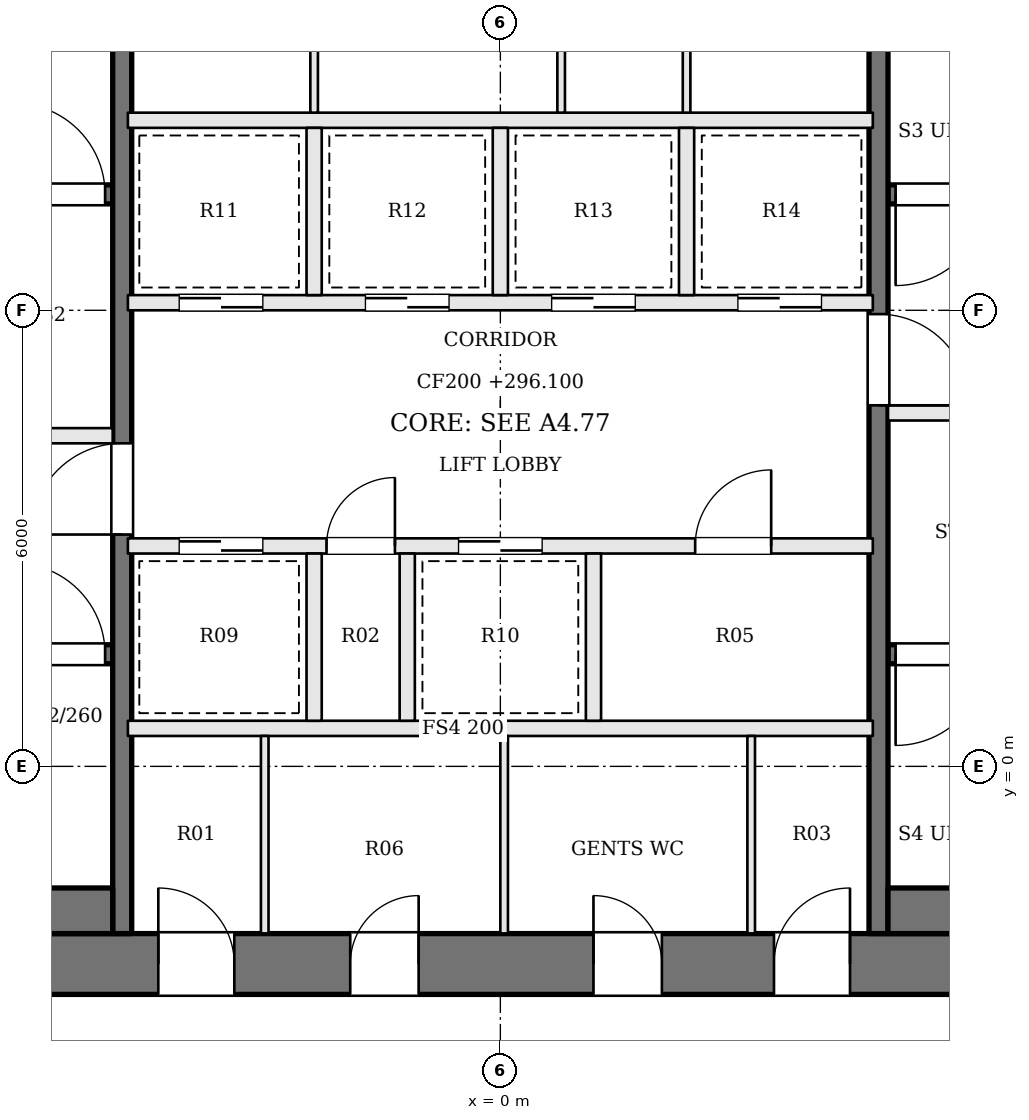
"""IFC4 building model, lengths in metres.
Left out: names, types, materials, properties, quantities, classifications, styles, units other than length and angle.
Written with IfcOpenShell. Run it as: python <this file> out.ifc"""

import sys

from ifc_helpers import new_model, si_unit, direction, frame, frame_2d, origin, place, context, subcontext, project, spatial, rectangle, extrude, element, fill, save


model = new_model("IFC4")
c1 = context("Model", 3, precision=1e-05, world=origin(), true_north=direction((0.0, 1.0)))
c2 = subcontext(c1, "Body", "Model", "MODEL_VIEW")
j1 = project(units=[si_unit("LENGTHUNIT", "METRE"), si_unit("PLANEANGLEUNIT", "RADIAN")], contexts=[c1])
p1 = place(None, origin())
s1 = spatial("IfcSite", under=j1, at=p1, CompositionType="ELEMENT")
p2 = place(p1, origin())
s2 = spatial("IfcBuilding", under=s1, at=p2, CompositionType="ELEMENT")
p3 = place(p2, frame((0.0, 0.0, 296.1)))
s3 = spatial("IfcBuildingStorey", under=s2, at=p3, CompositionType="ELEMENT", Elevation=296.1)
p4 = place(p3, frame((-13.0, -2.6, 0.0), z_axis=(0.0, 0.0, 1.0), x_axis=(1.0, 0.0, 0.0)))
e1 = element("IfcWall", 1, at=p4, inside=s3, PredefinedType="SHEAR", context=c2, shape_type="SweptSolid", body=[
    extrude(rectangle(XDim=26.0, YDim=0.8, at=frame_2d((13.0, 0.0))), origin(), (0.0, 0.0, 1.0), 3.9),
])
p5 = place(p4, frame((8.5, 0.0, 0.0)))
e2 = element("IfcOpeningElement", 2, at=p5, cuts=e1, PredefinedType="OPENING", context=c2, shape_type="SweptSolid", body=[
    extrude(rectangle(XDim=1.0, YDim=2.1, at=frame_2d((0.5, 1.05))), frame((0.0, 0.41, 0.0), z_axis=(0.0, -1.0, 0.0), x_axis=(1.0, 0.0, 0.0)), (0.0, 0.0, 1.0), 0.82),
])
p6 = place(p4, frame((11.025, 0.0, 0.0)))
e3 = element("IfcOpeningElement", 3, at=p6, cuts=e1, PredefinedType="OPENING", context=c2, shape_type="SweptSolid", body=[
    extrude(rectangle(XDim=0.9, YDim=2.1, at=frame_2d((0.45, 1.05))), frame((0.0, 0.41, 0.0), z_axis=(0.0, -1.0, 0.0), x_axis=(1.0, 0.0, 0.0)), (0.0, 0.0, 1.0), 0.82),
])
p7 = place(p4, frame((14.225, 0.0, 0.0)))
e4 = element("IfcOpeningElement", 4, at=p7, cuts=e1, PredefinedType="OPENING", context=c2, shape_type="SweptSolid", body=[
    extrude(rectangle(XDim=0.9, YDim=2.1, at=frame_2d((0.45, 1.05))), frame((0.0, 0.41, 0.0), z_axis=(0.0, -1.0, 0.0), x_axis=(1.0, 0.0, 0.0)), (0.0, 0.0, 1.0), 0.82),
])
p8 = place(p4, frame((16.6, 0.0, 0.0)))
e5 = element("IfcOpeningElement", 5, at=p8, cuts=e1, PredefinedType="OPENING", context=c2, shape_type="SweptSolid", body=[
    extrude(rectangle(XDim=1.0, YDim=2.1, at=frame_2d((0.5, 1.05))), frame((0.0, 0.41, 0.0), z_axis=(0.0, -1.0, 0.0), x_axis=(1.0, 0.0, 0.0)), (0.0, 0.0, 1.0), 0.82),
])
p9 = place(p3, frame((-12.2, 1.475, 0.0), z_axis=(0.0, 0.0, 1.0), x_axis=(1.0, 0.0, 0.0)))
e6 = element("IfcWall", 6, at=p9, inside=s3, PredefinedType="SOLIDWALL", context=c2, shape_type="SweptSolid", body=[
    extrude(rectangle(XDim=7.1, YDim=0.25, at=frame_2d((3.55, 0.0))), origin(), (0.0, 0.0, 1.0), 3.7),
])
p10 = place(p9, frame((5.8, 0.0, 0.0)))
e7 = element("IfcOpeningElement", 7, at=p10, cuts=e6, PredefinedType="OPENING", context=c2, shape_type="SweptSolid", body=[
    extrude(rectangle(XDim=1.2, YDim=2.1, at=frame_2d((0.6, 1.05))), frame((0.0, 0.135, 0.0), z_axis=(0.0, -1.0, 0.0), x_axis=(1.0, 0.0, 0.0)), (0.0, 0.0, 1.0), 0.27),
])
p11 = place(p3, frame((12.2, 7.525, 0.0), z_axis=(0.0, 0.0, 1.0), x_axis=(-1.0, 0.0, 0.0)))
e8 = element("IfcWall", 8, at=p11, inside=s3, PredefinedType="SOLIDWALL", context=c2, shape_type="SweptSolid", body=[
    extrude(rectangle(XDim=7.1, YDim=0.25, at=frame_2d((3.55, 0.0))), origin(), (0.0, 0.0, 1.0), 3.7),
])
p12 = place(p11, frame((5.8, 0.0, 0.0)))
e9 = element("IfcOpeningElement", 9, at=p12, cuts=e8, PredefinedType="OPENING", context=c2, shape_type="SweptSolid", body=[
    extrude(rectangle(XDim=1.2, YDim=2.1, at=frame_2d((0.6, 1.05))), frame((0.0, 0.135, 0.0), z_axis=(0.0, -1.0, 0.0), x_axis=(1.0, 0.0, 0.0)), (0.0, 0.0, 1.0), 0.27),
])
p13 = place(p3, frame((-12.2, 4.35, 0.0), z_axis=(0.0, 0.0, 1.0), x_axis=(1.0, 0.0, 0.0)))
e10 = element("IfcWall", 10, at=p13, inside=s3, PredefinedType="SOLIDWALL", context=c2, shape_type="SweptSolid", body=[
    extrude(rectangle(XDim=7.1, YDim=0.2, at=frame_2d((3.55, 0.0))), origin(), (0.0, 0.0, 1.0), 3.7),
])
p14 = place(p13, frame((4.4, 0.0, 0.0)))
e11 = element("IfcOpeningElement", 11, at=p14, cuts=e10, PredefinedType="OPENING", context=c2, shape_type="SweptSolid", body=[
    extrude(rectangle(XDim=1.2, YDim=2.1, at=frame_2d((0.6, 1.05))), frame((0.0, 0.11, 0.0), z_axis=(0.0, -1.0, 0.0), x_axis=(1.0, 0.0, 0.0)), (0.0, 0.0, 1.0), 0.22),
])
p15 = place(p13, frame((1.1, 0.0, 0.0)))
e12 = element("IfcOpeningElement", 12, at=p15, cuts=e10, PredefinedType="OPENING", context=c2, shape_type="SweptSolid", body=[
    extrude(rectangle(XDim=1.2, YDim=2.1, at=frame_2d((0.6, 1.05))), frame((0.0, 0.11, 0.0), z_axis=(0.0, -1.0, 0.0), x_axis=(1.0, 0.0, 0.0)), (0.0, 0.0, 1.0), 0.22),
])
p16 = place(p3, frame((12.2, 4.65, 0.0), z_axis=(0.0, 0.0, 1.0), x_axis=(-1.0, 0.0, 0.0)))
e13 = element("IfcWall", 13, at=p16, inside=s3, PredefinedType="SOLIDWALL", context=c2, shape_type="SweptSolid", body=[
    extrude(rectangle(XDim=7.1, YDim=0.2, at=frame_2d((3.55, 0.0))), origin(), (0.0, 0.0, 1.0), 3.7),
])
p17 = place(p16, frame((4.4, 0.0, 0.0)))
e14 = element("IfcOpeningElement", 14, at=p17, cuts=e13, PredefinedType="OPENING", context=c2, shape_type="SweptSolid", body=[
    extrude(rectangle(XDim=1.2, YDim=2.1, at=frame_2d((0.6, 1.05))), frame((0.0, 0.11, 0.0), z_axis=(0.0, -1.0, 0.0), x_axis=(1.0, 0.0, 0.0)), (0.0, 0.0, 1.0), 0.22),
])
p18 = place(p16, frame((1.1, 0.0, 0.0)))
e15 = element("IfcOpeningElement", 15, at=p18, cuts=e13, PredefinedType="OPENING", context=c2, shape_type="SweptSolid", body=[
    extrude(rectangle(XDim=1.2, YDim=2.1, at=frame_2d((0.6, 1.05))), frame((0.0, 0.11, 0.0), z_axis=(0.0, -1.0, 0.0), x_axis=(1.0, 0.0, 0.0)), (0.0, 0.0, 1.0), 0.22),
])
p19 = place(p3, frame((-12.2, 7.525, 0.0), z_axis=(0.0, 0.0, 1.0), x_axis=(1.0, 0.0, 0.0)))
e16 = element("IfcWall", 16, at=p19, inside=s3, PredefinedType="SOLIDWALL", context=c2, shape_type="SweptSolid", body=[
    extrude(rectangle(XDim=7.1, YDim=0.25, at=frame_2d((3.55, 0.0))), origin(), (0.0, 0.0, 1.0), 3.7),
])
p20 = place(p19, frame((5.8, 0.0, 0.0)))
e17 = element("IfcOpeningElement", 17, at=p20, cuts=e16, PredefinedType="OPENING", context=c2, shape_type="SweptSolid", body=[
    extrude(rectangle(XDim=1.2, YDim=2.1, at=frame_2d((0.6, 1.05))), frame((0.0, 0.135, 0.0), z_axis=(0.0, -1.0, 0.0), x_axis=(1.0, 0.0, 0.0)), (0.0, 0.0, 1.0), 0.27),
])
p21 = place(p3, frame((12.2, 1.475, 0.0), z_axis=(0.0, 0.0, 1.0), x_axis=(-1.0, 0.0, 0.0)))
e18 = element("IfcWall", 18, at=p21, inside=s3, PredefinedType="SOLIDWALL", context=c2, shape_type="SweptSolid", body=[
    extrude(rectangle(XDim=7.1, YDim=0.25, at=frame_2d((3.55, 0.0))), origin(), (0.0, 0.0, 1.0), 3.7),
])
p22 = place(p21, frame((5.8, 0.0, 0.0)))
e19 = element("IfcOpeningElement", 19, at=p22, cuts=e18, PredefinedType="OPENING", context=c2, shape_type="SweptSolid", body=[
    extrude(rectangle(XDim=1.2, YDim=2.1, at=frame_2d((0.6, 1.05))), frame((0.0, 0.135, 0.0), z_axis=(0.0, -1.0, 0.0), x_axis=(1.0, 0.0, 0.0)), (0.0, 0.0, 1.0), 0.27),
])
p23 = place(p3, frame((-4.975, -2.2, 0.0), z_axis=(0.0, 0.0, 1.0), x_axis=(0.0, 1.0, 0.0)))
e20 = element("IfcWall", 20, at=p23, inside=s3, PredefinedType="SOLIDWALL", context=c2, shape_type="SweptSolid", body=[
    extrude(rectangle(XDim=13.4, YDim=0.25, at=frame_2d((6.7, 0.0))), origin(), (0.0, 0.0, 1.0), 3.7),
])
p24 = place(p23, frame((5.25, 0.0, 0.0)))
e21 = element("IfcOpeningElement", 21, at=p24, cuts=e20, PredefinedType="OPENING", context=c2, shape_type="SweptSolid", body=[
    extrude(rectangle(XDim=1.2, YDim=2.1, at=frame_2d((0.6, 1.05))), frame((0.0, 0.135, 0.0), z_axis=(0.0, -1.0, 0.0), x_axis=(1.0, 0.0, 0.0)), (0.0, 0.0, 1.0), 0.27),
])
p25 = place(p3, frame((4.975, 11.2, 0.0), z_axis=(0.0, 0.0, 1.0), x_axis=(0.0, -1.0, 0.0)))
e22 = element("IfcWall", 22, at=p25, inside=s3, PredefinedType="SOLIDWALL", context=c2, shape_type="SweptSolid", body=[
    extrude(rectangle(XDim=13.4, YDim=0.25, at=frame_2d((6.7, 0.0))), origin(), (0.0, 0.0, 1.0), 3.7),
])
p26 = place(p25, frame((5.25, 0.0, 0.0)))
e23 = element("IfcOpeningElement", 23, at=p26, cuts=e22, PredefinedType="OPENING", context=c2, shape_type="SweptSolid", body=[
    extrude(rectangle(XDim=1.2, YDim=2.1, at=frame_2d((0.6, 1.05))), frame((0.0, 0.135, 0.0), z_axis=(0.0, -1.0, 0.0), x_axis=(1.0, 0.0, 0.0)), (0.0, 0.0, 1.0), 0.27),
])
for number, where, z_axis, x_axis in (
    (24, (-12.2, -1.9, 0.0), (0.0, 0.0, 1.0), (1.0, 0.0, 0.0)),
    (25, (12.2, -1.9, 0.0), (0.0, 0.0, 1.0), (-1.0, 0.0, 0.0)),
):
    element("IfcWall", number, at=place(p3, frame(where, z_axis=z_axis, x_axis=x_axis)), inside=s3, PredefinedType="SOLIDWALL", context=c2, shape_type="SweptSolid", body=[
        extrude(rectangle(XDim=7.1, YDim=0.6, at=frame_2d((3.55, 0.0))), origin(), (0.0, 0.0, 1.0), 3.7),
    ])
p27 = place(p3, frame((-4.9, 0.5, 0.0), z_axis=(0.0, 0.0, 1.0), x_axis=(1.0, 0.0, 0.0)))
e26 = element("IfcWall", 26, at=p27, inside=s3, PredefinedType="SOLIDWALL", context=c2, shape_type="SweptSolid", body=[
    extrude(rectangle(XDim=9.8, YDim=0.2, at=frame_2d((4.9, 0.0))), origin(), (0.0, 0.0, 1.0), 3.7),
])
p28 = place(p3, frame((-4.9, 2.9, 0.0), z_axis=(0.0, 0.0, 1.0), x_axis=(1.0, 0.0, 0.0)))
e27 = element("IfcWall", 27, at=p28, inside=s3, PredefinedType="SOLIDWALL", context=c2, shape_type="SweptSolid", body=[
    extrude(rectangle(XDim=9.8, YDim=0.2, at=frame_2d((4.9, 0.0))), origin(), (0.0, 0.0, 1.0), 3.7),
])
p29 = place(p28, frame((0.675, 0.0, 0.0)))
e28 = element("IfcOpeningElement", 28, at=p29, cuts=e27, PredefinedType="OPENING", context=c2, shape_type="SweptSolid", body=[
    extrude(rectangle(XDim=1.1, YDim=2.1, at=frame_2d((0.55, 1.05))), frame((0.0, 0.11, 0.0), z_axis=(0.0, -1.0, 0.0), x_axis=(1.0, 0.0, 0.0)), (0.0, 0.0, 1.0), 0.22),
])
p30 = place(p28, frame((2.613, 0.0, 0.0)))
e29 = element("IfcOpeningElement", 29, at=p30, cuts=e27, PredefinedType="OPENING", context=c2, shape_type="SweptSolid", body=[
    extrude(rectangle(XDim=0.9, YDim=2.1, at=frame_2d((0.45, 1.05))), frame((0.0, 0.11, 0.0), z_axis=(0.0, -1.0, 0.0), x_axis=(1.0, 0.0, 0.0)), (0.0, 0.0, 1.0), 0.22),
])
p31 = place(p28, frame((4.35, 0.0, 0.0)))
e30 = element("IfcOpeningElement", 30, at=p31, cuts=e27, PredefinedType="OPENING", context=c2, shape_type="SweptSolid", body=[
    extrude(rectangle(XDim=1.1, YDim=2.1, at=frame_2d((0.55, 1.05))), frame((0.0, 0.11, 0.0), z_axis=(0.0, -1.0, 0.0), x_axis=(1.0, 0.0, 0.0)), (0.0, 0.0, 1.0), 0.22),
])
p32 = place(p28, frame((7.463, 0.0, 0.0)))
e31 = element("IfcOpeningElement", 31, at=p32, cuts=e27, PredefinedType="OPENING", context=c2, shape_type="SweptSolid", body=[
    extrude(rectangle(XDim=1.0, YDim=2.1, at=frame_2d((0.5, 1.05))), frame((0.0, 0.11, 0.0), z_axis=(0.0, -1.0, 0.0), x_axis=(1.0, 0.0, 0.0)), (0.0, 0.0, 1.0), 0.22),
])
p33 = place(p3, frame((-4.9, 6.1, 0.0), z_axis=(0.0, 0.0, 1.0), x_axis=(1.0, 0.0, 0.0)))
e32 = element("IfcWall", 32, at=p33, inside=s3, PredefinedType="SOLIDWALL", context=c2, shape_type="SweptSolid", body=[
    extrude(rectangle(XDim=9.8, YDim=0.2, at=frame_2d((4.9, 0.0))), origin(), (0.0, 0.0, 1.0), 3.7),
])
p34 = place(p33, frame((0.675, 0.0, 0.0)))
e33 = element("IfcOpeningElement", 33, at=p34, cuts=e32, PredefinedType="OPENING", context=c2, shape_type="SweptSolid", body=[
    extrude(rectangle(XDim=1.1, YDim=2.1, at=frame_2d((0.55, 1.05))), frame((0.0, 0.11, 0.0), z_axis=(0.0, -1.0, 0.0), x_axis=(1.0, 0.0, 0.0)), (0.0, 0.0, 1.0), 0.22),
])
p35 = place(p33, frame((3.125, 0.0, 0.0)))
e34 = element("IfcOpeningElement", 34, at=p35, cuts=e32, PredefinedType="OPENING", context=c2, shape_type="SweptSolid", body=[
    extrude(rectangle(XDim=1.1, YDim=2.1, at=frame_2d((0.55, 1.05))), frame((0.0, 0.11, 0.0), z_axis=(0.0, -1.0, 0.0), x_axis=(1.0, 0.0, 0.0)), (0.0, 0.0, 1.0), 0.22),
])
p36 = place(p33, frame((5.575, 0.0, 0.0)))
e35 = element("IfcOpeningElement", 35, at=p36, cuts=e32, PredefinedType="OPENING", context=c2, shape_type="SweptSolid", body=[
    extrude(rectangle(XDim=1.1, YDim=2.1, at=frame_2d((0.55, 1.05))), frame((0.0, 0.11, 0.0), z_axis=(0.0, -1.0, 0.0), x_axis=(1.0, 0.0, 0.0)), (0.0, 0.0, 1.0), 0.22),
])
p37 = place(p33, frame((8.025, 0.0, 0.0)))
e36 = element("IfcOpeningElement", 36, at=p37, cuts=e32, PredefinedType="OPENING", context=c2, shape_type="SweptSolid", body=[
    extrude(rectangle(XDim=1.1, YDim=2.1, at=frame_2d((0.55, 1.05))), frame((0.0, 0.11, 0.0), z_axis=(0.0, -1.0, 0.0), x_axis=(1.0, 0.0, 0.0)), (0.0, 0.0, 1.0), 0.22),
])
p38 = place(p3, frame((-4.9, 8.5, 0.0), z_axis=(0.0, 0.0, 1.0), x_axis=(1.0, 0.0, 0.0)))
e37 = element("IfcWall", 37, at=p38, inside=s3, PredefinedType="SOLIDWALL", context=c2, shape_type="SweptSolid", body=[
    extrude(rectangle(XDim=9.8, YDim=0.2, at=frame_2d((4.9, 0.0))), origin(), (0.0, 0.0, 1.0), 3.7),
])
for number, where, z_axis, x_axis in (
    (38, (-2.45, 0.6, 0.0), (0.0, 0.0, 1.0), (0.0, 1.0, 0.0)),
    (39, (-1.225, 0.6, 0.0), (0.0, 0.0, 1.0), (0.0, 1.0, 0.0)),
    (40, (1.225, 0.6, 0.0), (0.0, 0.0, 1.0), (0.0, 1.0, 0.0)),
    (41, (-2.45, 6.2, 0.0), (0.0, 0.0, 1.0), (0.0, 1.0, 0.0)),
    (42, (0.0, 6.2, 0.0), (0.0, 0.0, 1.0), (0.0, 1.0, 0.0)),
    (43, (2.45, 6.2, 0.0), (0.0, 0.0, 1.0), (0.0, 1.0, 0.0)),
):
    element("IfcWall", number, at=place(p3, frame(where, z_axis=z_axis, x_axis=x_axis)), inside=s3, PredefinedType="SOLIDWALL", context=c2, shape_type="SweptSolid", body=[
        extrude(rectangle(XDim=2.2, YDim=0.2, at=frame_2d((1.1, 0.0))), origin(), (0.0, 0.0, 1.0), 3.7),
    ])
for number, where, z_axis, x_axis in (
    (44, (-3.1, -2.2, 0.0), (0.0, 0.0, 1.0), (0.0, 1.0, 0.0)),
    (45, (0.05, -2.2, 0.0), (0.0, 0.0, 1.0), (0.0, 1.0, 0.0)),
    (46, (3.3, -2.2, 0.0), (0.0, 0.0, 1.0), (0.0, 1.0, 0.0)),
    (47, (-2.45, 8.6, 0.0), (0.0, 0.0, 1.0), (0.0, 1.0, 0.0)),
    (48, (0.8, 8.6, 0.0), (0.0, 0.0, 1.0), (0.0, 1.0, 0.0)),
    (49, (2.45, 8.6, 0.0), (0.0, 0.0, 1.0), (0.0, 1.0, 0.0)),
):
    element("IfcWall", number, at=place(p3, frame(where, z_axis=z_axis, x_axis=x_axis)), inside=s3, PredefinedType="PARTITIONING", context=c2, shape_type="SweptSolid", body=[
        extrude(rectangle(XDim=2.6, YDim=0.1, at=frame_2d((1.3, 0.0))), origin(), (0.0, 0.0, 1.0), 3.7),
    ])
p39 = place(p24, origin())
e50 = element("IfcDoor", 50, at=p39, inside=s3, OperationType="SINGLE_SWING_LEFT", PredefinedType="DOOR", context=c2, shape_type="SweptSolid", body=[
    extrude(rectangle(XDim=1.2, YDim=2.1, at=frame_2d((0.6, 1.05))), frame((0.0, 0.025, 0.0), z_axis=(0.0, -1.0, 0.0), x_axis=(1.0, 0.0, 0.0)), (0.0, 0.0, 1.0), 0.05),
])
fill(e21, e50)
p40 = place(p26, origin())
e51 = element("IfcDoor", 51, at=p40, inside=s3, OperationType="SINGLE_SWING_RIGHT", PredefinedType="DOOR", context=c2, shape_type="SweptSolid", body=[
    extrude(rectangle(XDim=1.2, YDim=2.1, at=frame_2d((0.6, 1.05))), frame((0.0, 0.025, 0.0), z_axis=(0.0, -1.0, 0.0), x_axis=(1.0, 0.0, 0.0)), (0.0, 0.0, 1.0), 0.05),
])
fill(e23, e51)
p41 = place(p10, origin())
e52 = element("IfcDoor", 52, at=p41, inside=s3, OperationType="SINGLE_SWING_LEFT", PredefinedType="DOOR", context=c2, shape_type="SweptSolid", body=[
    extrude(rectangle(XDim=1.2, YDim=2.1, at=frame_2d((0.6, 1.05))), frame((0.0, 0.025, 0.0), z_axis=(0.0, -1.0, 0.0), x_axis=(1.0, 0.0, 0.0)), (0.0, 0.0, 1.0), 0.05),
])
fill(e7, e52)
p42 = place(p12, origin())
e53 = element("IfcDoor", 53, at=p42, inside=s3, OperationType="SINGLE_SWING_RIGHT", PredefinedType="DOOR", context=c2, shape_type="SweptSolid", body=[
    extrude(rectangle(XDim=1.2, YDim=2.1, at=frame_2d((0.6, 1.05))), frame((0.0, 0.025, 0.0), z_axis=(0.0, -1.0, 0.0), x_axis=(1.0, 0.0, 0.0)), (0.0, 0.0, 1.0), 0.05),
])
fill(e9, e53)
p43 = place(p20, origin())
e54 = element("IfcDoor", 54, at=p43, inside=s3, OperationType="SINGLE_SWING_LEFT", PredefinedType="DOOR", context=c2, shape_type="SweptSolid", body=[
    extrude(rectangle(XDim=1.2, YDim=2.1, at=frame_2d((0.6, 1.05))), frame((0.0, 0.025, 0.0), z_axis=(0.0, -1.0, 0.0), x_axis=(1.0, 0.0, 0.0)), (0.0, 0.0, 1.0), 0.05),
])
fill(e17, e54)
p44 = place(p22, origin())
e55 = element("IfcDoor", 55, at=p44, inside=s3, OperationType="SINGLE_SWING_RIGHT", PredefinedType="DOOR", context=c2, shape_type="SweptSolid", body=[
    extrude(rectangle(XDim=1.2, YDim=2.1, at=frame_2d((0.6, 1.05))), frame((0.0, 0.025, 0.0), z_axis=(0.0, -1.0, 0.0), x_axis=(1.0, 0.0, 0.0)), (0.0, 0.0, 1.0), 0.05),
])
fill(e19, e55)
p45 = place(p29, origin())
e56 = element("IfcDoor", 56, at=p45, inside=s3, OperationType="SLIDING_TO_RIGHT", PredefinedType="DOOR", context=c2, shape_type="SweptSolid", body=[
    extrude(rectangle(XDim=1.1, YDim=2.1, at=frame_2d((0.55, 1.05))), frame((0.0, 0.025, 0.0), z_axis=(0.0, -1.0, 0.0), x_axis=(1.0, 0.0, 0.0)), (0.0, 0.0, 1.0), 0.05),
])
fill(e28, e56)
p46 = place(p30, origin())
e57 = element("IfcDoor", 57, at=p46, inside=s3, OperationType="SINGLE_SWING_RIGHT", PredefinedType="DOOR", context=c2, shape_type="SweptSolid", body=[
    extrude(rectangle(XDim=0.9, YDim=2.1, at=frame_2d((0.45, 1.05))), frame((0.0, 0.025, 0.0), z_axis=(0.0, -1.0, 0.0), x_axis=(1.0, 0.0, 0.0)), (0.0, 0.0, 1.0), 0.05),
])
fill(e29, e57)
p47 = place(p31, origin())
e58 = element("IfcDoor", 58, at=p47, inside=s3, OperationType="SLIDING_TO_LEFT", PredefinedType="DOOR", context=c2, shape_type="SweptSolid", body=[
    extrude(rectangle(XDim=1.1, YDim=2.1, at=frame_2d((0.55, 1.05))), frame((0.0, 0.025, 0.0), z_axis=(0.0, -1.0, 0.0), x_axis=(1.0, 0.0, 0.0)), (0.0, 0.0, 1.0), 0.05),
])
fill(e30, e58)
p48 = place(p32, origin())
e59 = element("IfcDoor", 59, at=p48, inside=s3, OperationType="SINGLE_SWING_RIGHT", PredefinedType="DOOR", context=c2, shape_type="SweptSolid", body=[
    extrude(rectangle(XDim=1.0, YDim=2.1, at=frame_2d((0.5, 1.05))), frame((0.0, 0.025, 0.0), z_axis=(0.0, -1.0, 0.0), x_axis=(1.0, 0.0, 0.0)), (0.0, 0.0, 1.0), 0.05),
])
fill(e31, e59)
p49 = place(p34, origin())
e60 = element("IfcDoor", 60, at=p49, inside=s3, OperationType="SLIDING_TO_RIGHT", PredefinedType="DOOR", context=c2, shape_type="SweptSolid", body=[
    extrude(rectangle(XDim=1.1, YDim=2.1, at=frame_2d((0.55, 1.05))), frame((0.0, 0.025, 0.0), z_axis=(0.0, -1.0, 0.0), x_axis=(1.0, 0.0, 0.0)), (0.0, 0.0, 1.0), 0.05),
])
fill(e33, e60)
p50 = place(p35, origin())
e61 = element("IfcDoor", 61, at=p50, inside=s3, OperationType="SLIDING_TO_LEFT", PredefinedType="DOOR", context=c2, shape_type="SweptSolid", body=[
    extrude(rectangle(XDim=1.1, YDim=2.1, at=frame_2d((0.55, 1.05))), frame((0.0, 0.025, 0.0), z_axis=(0.0, -1.0, 0.0), x_axis=(1.0, 0.0, 0.0)), (0.0, 0.0, 1.0), 0.05),
])
fill(e34, e61)
p51 = place(p36, origin())
e62 = element("IfcDoor", 62, at=p51, inside=s3, OperationType="SLIDING_TO_RIGHT", PredefinedType="DOOR", context=c2, shape_type="SweptSolid", body=[
    extrude(rectangle(XDim=1.1, YDim=2.1, at=frame_2d((0.55, 1.05))), frame((0.0, 0.025, 0.0), z_axis=(0.0, -1.0, 0.0), x_axis=(1.0, 0.0, 0.0)), (0.0, 0.0, 1.0), 0.05),
])
fill(e35, e62)
p52 = place(p37, origin())
e63 = element("IfcDoor", 63, at=p52, inside=s3, OperationType="SLIDING_TO_LEFT", PredefinedType="DOOR", context=c2, shape_type="SweptSolid", body=[
    extrude(rectangle(XDim=1.1, YDim=2.1, at=frame_2d((0.55, 1.05))), frame((0.0, 0.025, 0.0), z_axis=(0.0, -1.0, 0.0), x_axis=(1.0, 0.0, 0.0)), (0.0, 0.0, 1.0), 0.05),
])
fill(e36, e63)
p53 = place(p5, origin())
e64 = element("IfcDoor", 64, at=p53, inside=s3, OperationType="SINGLE_SWING_LEFT", PredefinedType="DOOR", context=c2, shape_type="SweptSolid", body=[
    extrude(rectangle(XDim=1.0, YDim=2.1, at=frame_2d((0.5, 1.05))), frame((0.0, 0.025, 0.0), z_axis=(0.0, -1.0, 0.0), x_axis=(1.0, 0.0, 0.0)), (0.0, 0.0, 1.0), 0.05),
])
fill(e2, e64)
p54 = place(p6, origin())
e65 = element("IfcDoor", 65, at=p54, inside=s3, OperationType="SINGLE_SWING_RIGHT", PredefinedType="DOOR", context=c2, shape_type="SweptSolid", body=[
    extrude(rectangle(XDim=0.9, YDim=2.1, at=frame_2d((0.45, 1.05))), frame((0.0, 0.025, 0.0), z_axis=(0.0, -1.0, 0.0), x_axis=(1.0, 0.0, 0.0)), (0.0, 0.0, 1.0), 0.05),
])
fill(e3, e65)
p55 = place(p7, origin())
e66 = element("IfcDoor", 66, at=p55, inside=s3, OperationType="SINGLE_SWING_LEFT", PredefinedType="DOOR", context=c2, shape_type="SweptSolid", body=[
    extrude(rectangle(XDim=0.9, YDim=2.1, at=frame_2d((0.45, 1.05))), frame((0.0, 0.025, 0.0), z_axis=(0.0, -1.0, 0.0), x_axis=(1.0, 0.0, 0.0)), (0.0, 0.0, 1.0), 0.05),
])
fill(e4, e66)
p56 = place(p8, origin())
e67 = element("IfcDoor", 67, at=p56, inside=s3, OperationType="SINGLE_SWING_RIGHT", PredefinedType="DOOR", context=c2, shape_type="SweptSolid", body=[
    extrude(rectangle(XDim=1.0, YDim=2.1, at=frame_2d((0.5, 1.05))), frame((0.0, 0.025, 0.0), z_axis=(0.0, -1.0, 0.0), x_axis=(1.0, 0.0, 0.0)), (0.0, 0.0, 1.0), 0.05),
])
fill(e5, e67)
save(model, sys.argv[1])
